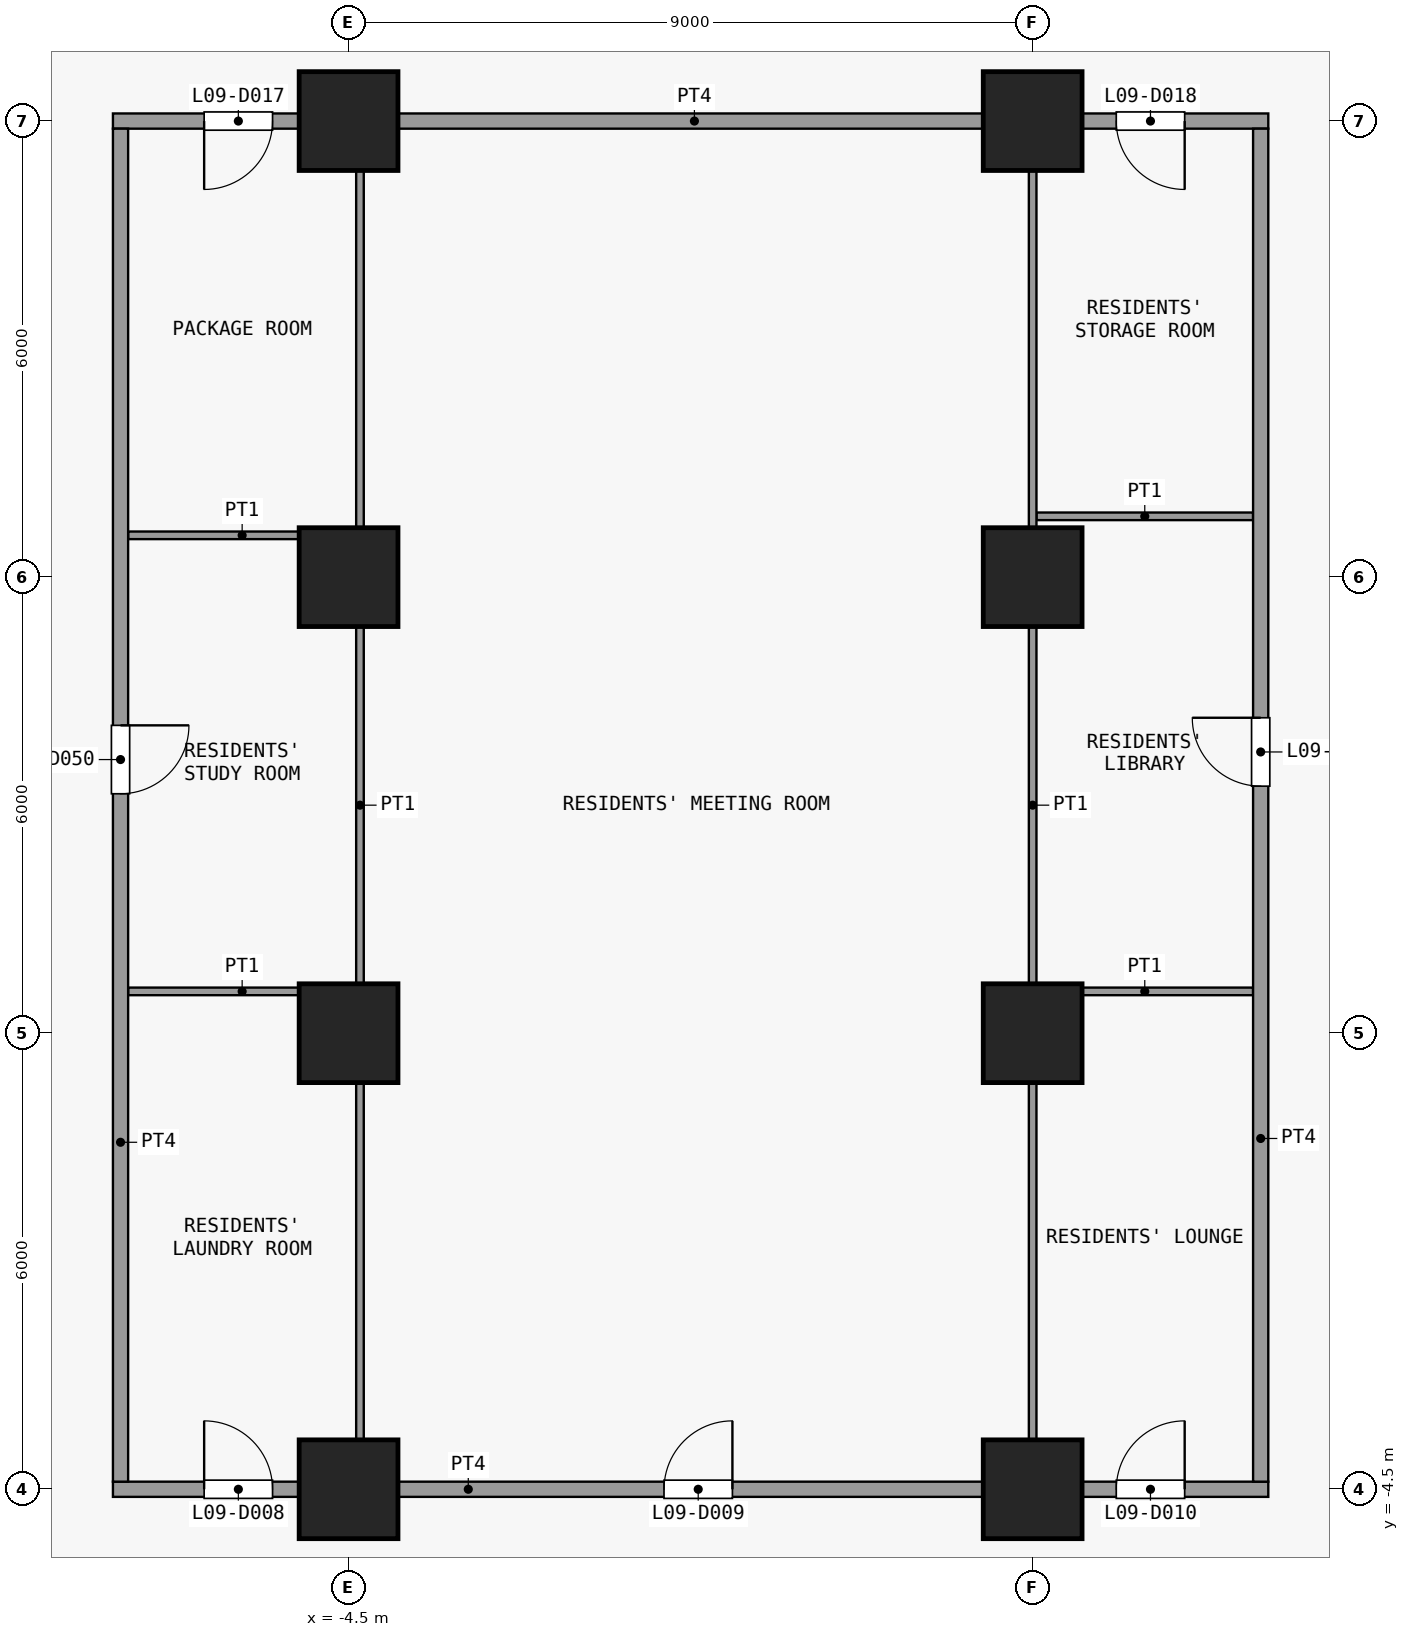
"""IFC4 building model, lengths in metres.
Left out: names, types, materials, properties, quantities, classifications, styles, units other than length and angle.
Written with IfcOpenShell. Run it as: python <this file> out.ifc"""

import sys

from ifc_helpers import new_model, si_unit, direction, frame, frame_2d, origin, origin_2d, place, context, subcontext, project, spatial, rectangle, extrude, element, fill, save


model = new_model("IFC4")
c1 = context("Model", 3, precision=1e-05, world=origin(), true_north=direction((0.0, 1.0)))
c2 = subcontext(c1, "Body", "Model", "MODEL_VIEW")
j1 = project(units=[si_unit("LENGTHUNIT", "METRE"), si_unit("PLANEANGLEUNIT", "RADIAN")], contexts=[c1])
p1 = place(None, origin())
s1 = spatial("IfcSite", under=j1, at=p1, CompositionType="ELEMENT")
p2 = place(p1, origin())
s2 = spatial("IfcBuilding", under=s1, at=p2, CompositionType="ELEMENT")
p3 = place(p2, frame((0.0, 0.0, 43.3)))
s3 = spatial("IfcBuildingStorey", under=s2, at=p3, CompositionType="ELEMENT", Elevation=43.3)
for number, where, z_axis, x_axis in (
    (1, (-4.5, -4.5, 0.0), (0.0, 0.0, 1.0), (1.0, 0.0, 0.0)),
    (2, (-4.5, 1.5, 0.0), (0.0, 0.0, 1.0), (1.0, 0.0, 0.0)),
    (3, (-4.5, 7.5, 0.0), (0.0, 0.0, 1.0), (1.0, 0.0, 0.0)),
    (4, (-4.5, 13.5, 0.0), (0.0, 0.0, 1.0), (1.0, 0.0, 0.0)),
    (5, (4.5, -4.5, 0.0), (0.0, 0.0, 1.0), (1.0, 0.0, 0.0)),
    (6, (4.5, 1.5, 0.0), (0.0, 0.0, 1.0), (1.0, 0.0, 0.0)),
    (7, (4.5, 7.5, 0.0), (0.0, 0.0, 1.0), (1.0, 0.0, 0.0)),
    (8, (4.5, 13.5, 0.0), (0.0, 0.0, 1.0), (1.0, 0.0, 0.0)),
):
    element("IfcColumn", number, at=place(p3, frame(where, z_axis=z_axis, x_axis=x_axis)), inside=s3, PredefinedType="COLUMN", context=c2, shape_type="SweptSolid", body=[
        extrude(rectangle(XDim=1.3, YDim=1.3, at=origin_2d()), origin(), (0.0, 0.0, 1.0), 3.6),
    ])
p4 = place(p3, frame((-7.6, -4.5, 0.0), z_axis=(0.0, 0.0, 1.0), x_axis=(1.0, 0.0, 0.0)))
e9 = element("IfcWall", 9, at=p4, inside=s3, PredefinedType="PARTITIONING", context=c2, shape_type="SweptSolid", body=[
    extrude(rectangle(XDim=15.2, YDim=0.2, at=frame_2d((7.6, 0.0))), origin(), (0.0, 0.0, 1.0), 3.3),
])
p5 = place(p4, frame((1.2, 0.0, 0.0)))
e10 = element("IfcOpeningElement", 10, at=p5, cuts=e9, PredefinedType="OPENING", context=c2, shape_type="SweptSolid", body=[
    extrude(rectangle(XDim=0.9, YDim=2.1, at=frame_2d((0.45, 1.05))), frame((0.0, 0.11, 0.0), z_axis=(0.0, -1.0, 0.0), x_axis=(1.0, 0.0, 0.0)), (0.0, 0.0, 1.0), 0.22),
])
p6 = place(p4, frame((7.25, 0.0, 0.0)))
e11 = element("IfcOpeningElement", 11, at=p6, cuts=e9, PredefinedType="OPENING", context=c2, shape_type="SweptSolid", body=[
    extrude(rectangle(XDim=0.9, YDim=2.1, at=frame_2d((0.45, 1.05))), frame((0.0, 0.11, 0.0), z_axis=(0.0, -1.0, 0.0), x_axis=(1.0, 0.0, 0.0)), (0.0, 0.0, 1.0), 0.22),
])
p7 = place(p4, frame((13.2, 0.0, 0.0)))
e12 = element("IfcOpeningElement", 12, at=p7, cuts=e9, PredefinedType="OPENING", context=c2, shape_type="SweptSolid", body=[
    extrude(rectangle(XDim=0.9, YDim=2.1, at=frame_2d((0.45, 1.05))), frame((0.0, 0.11, 0.0), z_axis=(0.0, -1.0, 0.0), x_axis=(1.0, 0.0, 0.0)), (0.0, 0.0, 1.0), 0.22),
])
p8 = place(p3, frame((-7.4, 2.05, 0.0), z_axis=(0.0, 0.0, 1.0), x_axis=(1.0, 0.0, 0.0)))
e13 = element("IfcWall", 13, at=p8, inside=s3, PredefinedType="PARTITIONING", context=c2, shape_type="SweptSolid", body=[
    extrude(rectangle(XDim=3.0, YDim=0.1, at=frame_2d((1.5, 0.0))), origin(), (0.0, 0.0, 1.0), 3.3),
])
p9 = place(p3, frame((4.55, 2.05, 0.0), z_axis=(0.0, 0.0, 1.0), x_axis=(1.0, 0.0, 0.0)))
e14 = element("IfcWall", 14, at=p9, inside=s3, PredefinedType="PARTITIONING", context=c2, shape_type="SweptSolid", body=[
    extrude(rectangle(XDim=2.85, YDim=0.1, at=frame_2d((1.425, 0.0))), origin(), (0.0, 0.0, 1.0), 3.3),
])
p10 = place(p3, frame((-7.4, 8.05, 0.0), z_axis=(0.0, 0.0, 1.0), x_axis=(1.0, 0.0, 0.0)))
e15 = element("IfcWall", 15, at=p10, inside=s3, PredefinedType="PARTITIONING", context=c2, shape_type="SweptSolid", body=[
    extrude(rectangle(XDim=3.0, YDim=0.1, at=frame_2d((1.5, 0.0))), origin(), (0.0, 0.0, 1.0), 3.3),
])
p11 = place(p3, frame((4.55, 8.3, 0.0), z_axis=(0.0, 0.0, 1.0), x_axis=(1.0, 0.0, 0.0)))
e16 = element("IfcWall", 16, at=p11, inside=s3, PredefinedType="PARTITIONING", context=c2, shape_type="SweptSolid", body=[
    extrude(rectangle(XDim=2.85, YDim=0.1, at=frame_2d((1.425, 0.0))), origin(), (0.0, 0.0, 1.0), 3.3),
])
p12 = place(p3, frame((-7.6, 13.5, 0.0), z_axis=(0.0, 0.0, 1.0), x_axis=(1.0, 0.0, 0.0)))
e17 = element("IfcWall", 17, at=p12, inside=s3, PredefinedType="PARTITIONING", context=c2, shape_type="SweptSolid", body=[
    extrude(rectangle(XDim=15.2, YDim=0.2, at=frame_2d((7.6, 0.0))), origin(), (0.0, 0.0, 1.0), 3.3),
])
p13 = place(p12, frame((1.2, 0.0, 0.0)))
e18 = element("IfcOpeningElement", 18, at=p13, cuts=e17, PredefinedType="OPENING", context=c2, shape_type="SweptSolid", body=[
    extrude(rectangle(XDim=0.9, YDim=2.1, at=frame_2d((0.45, 1.05))), frame((0.0, 0.11, 0.0), z_axis=(0.0, -1.0, 0.0), x_axis=(1.0, 0.0, 0.0)), (0.0, 0.0, 1.0), 0.22),
])
p14 = place(p12, frame((13.2, 0.0, 0.0)))
e19 = element("IfcOpeningElement", 19, at=p14, cuts=e17, PredefinedType="OPENING", context=c2, shape_type="SweptSolid", body=[
    extrude(rectangle(XDim=0.9, YDim=2.1, at=frame_2d((0.45, 1.05))), frame((0.0, 0.11, 0.0), z_axis=(0.0, -1.0, 0.0), x_axis=(1.0, 0.0, 0.0)), (0.0, 0.0, 1.0), 0.22),
])
p15 = place(p3, frame((-7.5, -4.4, 0.0), z_axis=(0.0, 0.0, 1.0), x_axis=(0.0, 1.0, 0.0)))
e20 = element("IfcWall", 20, at=p15, inside=s3, PredefinedType="PARTITIONING", context=c2, shape_type="SweptSolid", body=[
    extrude(rectangle(XDim=17.8, YDim=0.2, at=frame_2d((8.9, 0.0))), origin(), (0.0, 0.0, 1.0), 3.3),
])
p16 = place(p15, frame((9.05, 0.0, 0.0)))
e21 = element("IfcOpeningElement", 21, at=p16, cuts=e20, PredefinedType="OPENING", context=c2, shape_type="SweptSolid", body=[
    extrude(rectangle(XDim=0.9, YDim=2.1, at=frame_2d((0.45, 1.05))), frame((0.0, 0.11, 0.0), z_axis=(0.0, -1.0, 0.0), x_axis=(1.0, 0.0, 0.0)), (0.0, 0.0, 1.0), 0.22),
])
for number, where, z_axis, x_axis in (
    (22, (-4.35, -4.4, 0.0), (0.0, 0.0, 1.0), (0.0, 1.0, 0.0)),
    (23, (4.5, -4.4, 0.0), (0.0, 0.0, 1.0), (0.0, 1.0, 0.0)),
):
    element("IfcWall", number, at=place(p3, frame(where, z_axis=z_axis, x_axis=x_axis)), inside=s3, PredefinedType="PARTITIONING", context=c2, shape_type="SweptSolid", body=[
        extrude(rectangle(XDim=17.8, YDim=0.1, at=frame_2d((8.9, 0.0))), origin(), (0.0, 0.0, 1.0), 3.3),
    ])
p17 = place(p3, frame((7.5, -4.4, 0.0), z_axis=(0.0, 0.0, 1.0), x_axis=(0.0, 1.0, 0.0)))
e24 = element("IfcWall", 24, at=p17, inside=s3, PredefinedType="PARTITIONING", context=c2, shape_type="SweptSolid", body=[
    extrude(rectangle(XDim=17.8, YDim=0.2, at=frame_2d((8.9, 0.0))), origin(), (0.0, 0.0, 1.0), 3.3),
])
p18 = place(p17, frame((9.15, 0.0, 0.0)))
e25 = element("IfcOpeningElement", 25, at=p18, cuts=e24, PredefinedType="OPENING", context=c2, shape_type="SweptSolid", body=[
    extrude(rectangle(XDim=0.9, YDim=2.1, at=frame_2d((0.45, 1.05))), frame((0.0, 0.11, 0.0), z_axis=(0.0, -1.0, 0.0), x_axis=(1.0, 0.0, 0.0)), (0.0, 0.0, 1.0), 0.22),
])
p19 = place(p5, origin())
e26 = element("IfcDoor", 26, at=p19, inside=s3, OperationType="SINGLE_SWING_RIGHT", PredefinedType="DOOR", context=c2, shape_type="SweptSolid", body=[
    extrude(rectangle(XDim=0.9, YDim=2.1, at=frame_2d((0.45, 1.05))), frame((0.0, 0.025, 0.0), z_axis=(0.0, -1.0, 0.0), x_axis=(1.0, 0.0, 0.0)), (0.0, 0.0, 1.0), 0.05),
])
fill(e10, e26)
p20 = place(p6, origin())
e27 = element("IfcDoor", 27, at=p20, inside=s3, OperationType="SINGLE_SWING_LEFT", PredefinedType="DOOR", context=c2, shape_type="SweptSolid", body=[
    extrude(rectangle(XDim=0.9, YDim=2.1, at=frame_2d((0.45, 1.05))), frame((0.0, 0.025, 0.0), z_axis=(0.0, -1.0, 0.0), x_axis=(1.0, 0.0, 0.0)), (0.0, 0.0, 1.0), 0.05),
])
fill(e11, e27)
p21 = place(p7, origin())
e28 = element("IfcDoor", 28, at=p21, inside=s3, OperationType="SINGLE_SWING_LEFT", PredefinedType="DOOR", context=c2, shape_type="SweptSolid", body=[
    extrude(rectangle(XDim=0.9, YDim=2.1, at=frame_2d((0.45, 1.05))), frame((0.0, 0.025, 0.0), z_axis=(0.0, -1.0, 0.0), x_axis=(1.0, 0.0, 0.0)), (0.0, 0.0, 1.0), 0.05),
])
fill(e12, e28)
p22 = place(p13, origin())
e29 = element("IfcDoor", 29, at=p22, inside=s3, OperationType="SINGLE_SWING_LEFT", PredefinedType="DOOR", context=c2, shape_type="SweptSolid", body=[
    extrude(rectangle(XDim=0.9, YDim=2.1, at=frame_2d((0.45, 1.05))), frame((0.0, 0.025, 0.0), z_axis=(0.0, -1.0, 0.0), x_axis=(1.0, 0.0, 0.0)), (0.0, 0.0, 1.0), 0.05),
])
fill(e18, e29)
p23 = place(p14, origin())
e30 = element("IfcDoor", 30, at=p23, inside=s3, OperationType="SINGLE_SWING_RIGHT", PredefinedType="DOOR", context=c2, shape_type="SweptSolid", body=[
    extrude(rectangle(XDim=0.9, YDim=2.1, at=frame_2d((0.45, 1.05))), frame((0.0, 0.025, 0.0), z_axis=(0.0, -1.0, 0.0), x_axis=(1.0, 0.0, 0.0)), (0.0, 0.0, 1.0), 0.05),
])
fill(e19, e30)
p24 = place(p16, origin())
e31 = element("IfcDoor", 31, at=p24, inside=s3, OperationType="SINGLE_SWING_RIGHT", PredefinedType="DOOR", context=c2, shape_type="SweptSolid", body=[
    extrude(rectangle(XDim=0.9, YDim=2.1, at=frame_2d((0.45, 1.05))), frame((0.0, 0.025, 0.0), z_axis=(0.0, -1.0, 0.0), x_axis=(1.0, 0.0, 0.0)), (0.0, 0.0, 1.0), 0.05),
])
fill(e21, e31)
p25 = place(p18, origin())
e32 = element("IfcDoor", 32, at=p25, inside=s3, OperationType="SINGLE_SWING_LEFT", PredefinedType="DOOR", context=c2, shape_type="SweptSolid", body=[
    extrude(rectangle(XDim=0.9, YDim=2.1, at=frame_2d((0.45, 1.05))), frame((0.0, 0.025, 0.0), z_axis=(0.0, -1.0, 0.0), x_axis=(1.0, 0.0, 0.0)), (0.0, 0.0, 1.0), 0.05),
])
fill(e25, e32)
save(model, sys.argv[1])
